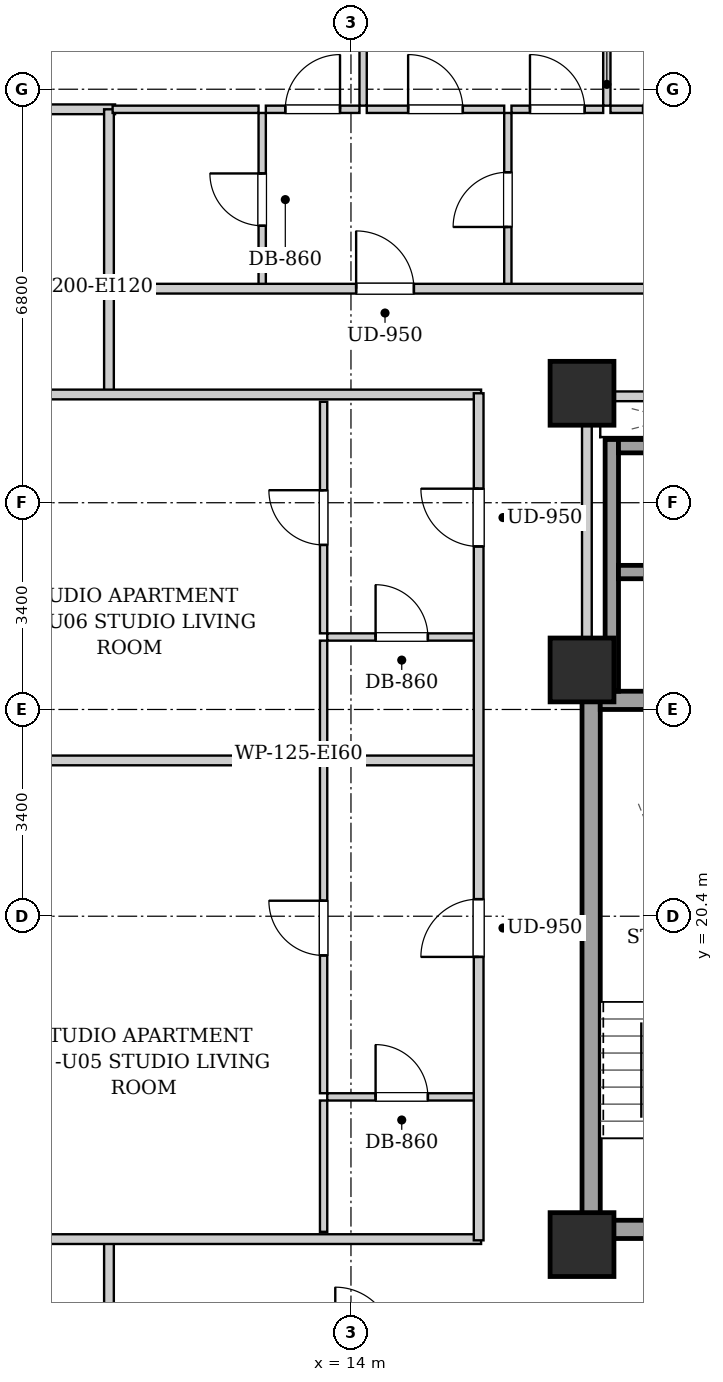
"""IFC4 building model, lengths in metres.
Left out: names, types, materials, properties, quantities, classifications, styles, units other than length and angle.
Written with IfcOpenShell. Run it as: python <this file> out.ifc"""

import sys

from ifc_helpers import new_model, si_unit, direction, frame, frame_2d, origin, origin_2d, place, context, subcontext, project, spatial, rectangle, extrude, element, fill, save


model = new_model("IFC4")
c1 = context("Model", 3, precision=1e-05, world=origin(), true_north=direction((0.0, 1.0)))
c2 = subcontext(c1, "Body", "Model", "MODEL_VIEW")
j1 = project(units=[si_unit("LENGTHUNIT", "METRE"), si_unit("PLANEANGLEUNIT", "RADIAN")], contexts=[c1])
p1 = place(None, origin())
s1 = spatial("IfcSite", under=j1, at=p1, CompositionType="ELEMENT")
p2 = place(p1, origin())
s2 = spatial("IfcBuilding", under=s1, at=p2, CompositionType="ELEMENT")
p3 = place(p2, frame((0.0, 0.0, 110.3)))
s3 = spatial("IfcBuildingStorey", under=s2, at=p3, CompositionType="ELEMENT", Elevation=110.3)
for number, where, z_axis, x_axis in (
    (1, (17.8, 15.0, 0.0), (0.0, 0.0, 1.0), (1.0, 0.0, 0.0)),
    (2, (17.8, 29.0, 0.0), (0.0, 0.0, 1.0), (1.0, 0.0, 0.0)),
    (3, (17.8, 24.45, 0.0), (0.0, 0.0, 1.0), (1.0, 0.0, 0.0)),
):
    element("IfcColumn", number, at=place(p3, frame(where, z_axis=z_axis, x_axis=x_axis)), inside=s3, PredefinedType="COLUMN", context=c2, shape_type="SweptSolid", body=[
        extrude(rectangle(XDim=1.05, YDim=1.05, at=origin_2d()), origin(), (0.0, 0.0, 1.0), 3.2),
    ])
p4 = place(p3, frame((17.95, 15.1, 0.0), z_axis=(0.0, 0.0, 1.0), x_axis=(0.0, 1.0, 0.0)))
e4 = element("IfcWall", 4, at=p4, inside=s3, PredefinedType="SHEAR", context=c2, shape_type="SweptSolid", body=[
    extrude(rectangle(XDim=9.0, YDim=0.3, at=frame_2d((4.5, 0.0))), origin(), (0.0, 0.0, 1.0), 2.94),
])
p5 = place(p3, frame((18.1, 23.95, 0.0), z_axis=(0.0, 0.0, 1.0), x_axis=(1.0, 0.0, 0.0)))
e5 = element("IfcWall", 5, at=p5, inside=s3, PredefinedType="SHEAR", context=c2, shape_type="SweptSolid", body=[
    extrude(rectangle(XDim=2.85, YDim=0.3, at=frame_2d((1.425, 0.0))), origin(), (0.0, 0.0, 1.0), 2.94),
])
p6 = place(p3, frame((18.1, 15.25, 0.0), z_axis=(0.0, 0.0, 1.0), x_axis=(1.0, 0.0, 0.0)))
e6 = element("IfcWall", 6, at=p6, inside=s3, PredefinedType="SHEAR", context=c2, shape_type="SweptSolid", body=[
    extrude(rectangle(XDim=2.85, YDim=0.3, at=frame_2d((1.425, 0.0))), origin(), (0.0, 0.0, 1.0), 2.94),
])
p7 = place(p6, frame((0.86, 0.0, 0.0)))
e7 = element("IfcOpeningElement", 7, at=p7, cuts=e6, PredefinedType="OPENING", context=c2, shape_type="SweptSolid", body=[
    extrude(rectangle(XDim=1.1, YDim=2.05, at=frame_2d((0.55, 1.025))), frame((0.0, 0.16, 0.0), z_axis=(0.0, -1.0, 0.0), x_axis=(1.0, 0.0, 0.0)), (0.0, 0.0, 1.0), 0.32),
])
p8 = place(p3, frame((18.29, 24.1, 0.0), z_axis=(0.0, 0.0, 1.0), x_axis=(0.0, 1.0, 0.0)))
e8 = element("IfcWall", 8, at=p8, inside=s3, PredefinedType="SHEAR", context=c2, shape_type="SweptSolid", body=[
    extrude(rectangle(XDim=4.14, YDim=0.22, at=frame_2d((2.07, 0.0))), origin(), (0.0, 0.0, 1.0), 2.94),
])
for number, where, z_axis, x_axis in (
    (9, (18.4, 26.06, 0.0), (0.0, 0.0, 1.0), (1.0, 0.0, 0.0)),
    (10, (18.4, 28.13, 0.0), (0.0, 0.0, 1.0), (1.0, 0.0, 0.0)),
):
    element("IfcWall", number, at=place(p3, frame(where, z_axis=z_axis, x_axis=x_axis)), inside=s3, PredefinedType="SHEAR", context=c2, shape_type="SweptSolid", body=[
        extrude(rectangle(XDim=1.9, YDim=0.22, at=frame_2d((0.95, 0.0))), origin(), (0.0, 0.0, 1.0), 2.94),
    ])
p9 = place(p3, frame((17.88, 24.12, 0.0), z_axis=(0.0, 0.0, 1.0), x_axis=(0.0, 1.0, 0.0)))
e11 = element("IfcWall", 11, at=p9, inside=s3, PredefinedType="PARTITIONING", context=c2, shape_type="SweptSolid", body=[
    extrude(rectangle(XDim=4.76, YDim=0.16, at=frame_2d((2.38, 0.0))), origin(), (0.0, 0.0, 1.0), 2.94),
])
p10 = place(p3, frame((17.96, 28.95, 0.0), z_axis=(0.0, 0.0, 1.0), x_axis=(1.0, 0.0, 0.0)))
e12 = element("IfcWall", 12, at=p10, inside=s3, PredefinedType="PARTITIONING", context=c2, shape_type="SweptSolid", body=[
    extrude(rectangle(XDim=4.29, YDim=0.16, at=frame_2d((2.145, 0.0))), origin(), (0.0, 0.0, 1.0), 2.313),
])
p11 = place(p10, frame((1.645, 0.0, 0.0)))
e13 = element("IfcOpeningElement", 13, at=p11, cuts=e12, PredefinedType="OPENING", context=c2, shape_type="SweptSolid", body=[
    extrude(rectangle(XDim=0.86, YDim=2.05, at=frame_2d((0.43, 1.025))), frame((0.0, 0.09, 0.0), z_axis=(0.0, -1.0, 0.0), x_axis=(1.0, 0.0, 0.0)), (0.0, 0.0, 1.0), 0.18),
])
for number, where, z_axis, x_axis in (
    (14, (10.02, 13.35, 0.0), (0.0, 0.0, 1.0), (0.0, 1.0, 0.0)),
    (15, (10.02, 28.98, 0.0), (0.0, 0.0, 1.0), (0.0, 1.0, 0.0)),
):
    element("IfcWall", number, at=place(p3, frame(where, z_axis=z_axis, x_axis=x_axis)), inside=s3, PredefinedType="PARTITIONING", context=c2, shape_type="SweptSolid", body=[
        extrude(rectangle(XDim=1.74, YDim=0.16, at=frame_2d((0.87, 0.0))), origin(), (0.0, 0.0, 1.0), 2.94),
    ])
for number, where, z_axis, x_axis in (
    (16, (7.78, 15.09, 0.0), (0.0, 0.0, 1.0), (1.0, 0.0, 0.0)),
    (17, (7.78, 28.98, 0.0), (0.0, 0.0, 1.0), (1.0, 0.0, 0.0)),
):
    element("IfcWall", number, at=place(p3, frame(where, z_axis=z_axis, x_axis=x_axis)), inside=s3, PredefinedType="PARTITIONING", context=c2, shape_type="SweptSolid", body=[
        extrude(rectangle(XDim=8.36, YDim=0.16, at=frame_2d((4.18, 0.0))), origin(), (0.0, 0.0, 1.0), 2.313),
    ])
p12 = place(p3, frame((7.78, 33.67, 0.0), z_axis=(0.0, 0.0, 1.0), x_axis=(1.0, 0.0, 0.0)))
e18 = element("IfcWall", 18, at=p12, inside=s3, PredefinedType="PARTITIONING", context=c2, shape_type="SweptSolid", body=[
    extrude(rectangle(XDim=2.34, YDim=0.16, at=frame_2d((1.17, 0.0))), origin(), (0.0, 0.0, 1.0), 2.94),
])
p13 = place(p3, frame((10.02, 30.76, 0.0), z_axis=(0.0, 0.0, 1.0), x_axis=(0.0, 1.0, 0.0)))
e19 = element("IfcWall", 19, at=p13, inside=s3, PredefinedType="PARTITIONING", context=c2, shape_type="SweptSolid", body=[
    extrude(rectangle(XDim=2.91, YDim=0.16, at=frame_2d((1.455, 0.0))), origin(), (0.0, 0.0, 1.0), 2.94),
])
p14 = place(p3, frame((12.54, 30.76, 0.0), z_axis=(0.0, 0.0, 1.0), x_axis=(0.0, 1.0, 0.0)))
e20 = element("IfcWall", 20, at=p14, inside=s3, PredefinedType="PARTITIONING", context=c2, shape_type="SweptSolid", body=[
    extrude(rectangle(XDim=2.85, YDim=0.12, at=frame_2d((1.425, 0.0))), origin(), (0.0, 0.0, 1.0), 2.94),
])
p15 = place(p14, frame((0.995, 0.0, 0.0)))
e21 = element("IfcOpeningElement", 21, at=p15, cuts=e20, PredefinedType="OPENING", context=c2, shape_type="SweptSolid", body=[
    extrude(rectangle(XDim=0.86, YDim=2.05, at=frame_2d((0.43, 1.025))), frame((0.0, 0.07, 0.0), z_axis=(0.0, -1.0, 0.0), x_axis=(1.0, 0.0, 0.0)), (0.0, 0.0, 1.0), 0.14),
])
p16 = place(p3, frame((10.08, 33.67, 0.0), z_axis=(0.0, 0.0, 1.0), x_axis=(1.0, 0.0, 0.0)))
e22 = element("IfcWall", 22, at=p16, inside=s3, PredefinedType="PARTITIONING", context=c2, shape_type="SweptSolid", body=[
    extrude(rectangle(XDim=2.4, YDim=0.12, at=frame_2d((1.2, 0.0))), origin(), (0.0, 0.0, 1.0), 2.94),
])
p17 = place(p3, frame((16.58, 30.76, 0.0), z_axis=(0.0, 0.0, 1.0), x_axis=(0.0, 1.0, 0.0)))
e23 = element("IfcWall", 23, at=p17, inside=s3, PredefinedType="PARTITIONING", context=c2, shape_type="SweptSolid", body=[
    extrude(rectangle(XDim=2.85, YDim=0.12, at=frame_2d((1.425, 0.0))), origin(), (0.0, 0.0, 1.0), 2.94),
])
p18 = place(p17, frame((0.975, 0.0, 0.0)))
e24 = element("IfcOpeningElement", 24, at=p18, cuts=e23, PredefinedType="OPENING", context=c2, shape_type="SweptSolid", body=[
    extrude(rectangle(XDim=0.9, YDim=2.05, at=frame_2d((0.45, 1.025))), frame((0.0, 0.07, 0.0), z_axis=(0.0, -1.0, 0.0), x_axis=(1.0, 0.0, 0.0)), (0.0, 0.0, 1.0), 0.14),
])
p19 = place(p3, frame((12.6, 33.67, 0.0), z_axis=(0.0, 0.0, 1.0), x_axis=(1.0, 0.0, 0.0)))
e25 = element("IfcWall", 25, at=p19, inside=s3, PredefinedType="PARTITIONING", context=c2, shape_type="SweptSolid", body=[
    extrude(rectangle(XDim=1.54, YDim=0.12, at=frame_2d((0.77, 0.0))), origin(), (0.0, 0.0, 1.0), 2.94),
])
p20 = place(p19, frame((0.32, 0.0, 0.0)))
e26 = element("IfcOpeningElement", 26, at=p20, cuts=e25, PredefinedType="OPENING", context=c2, shape_type="SweptSolid", body=[
    extrude(rectangle(XDim=0.9, YDim=2.05, at=frame_2d((0.45, 1.025))), frame((0.0, 0.07, 0.0), z_axis=(0.0, -1.0, 0.0), x_axis=(1.0, 0.0, 0.0)), (0.0, 0.0, 1.0), 0.14),
])
p21 = place(p3, frame((14.26, 33.67, 0.0), z_axis=(0.0, 0.0, 1.0), x_axis=(1.0, 0.0, 0.0)))
e27 = element("IfcWall", 27, at=p21, inside=s3, PredefinedType="PARTITIONING", context=c2, shape_type="SweptSolid", body=[
    extrude(rectangle(XDim=2.26, YDim=0.12, at=frame_2d((1.13, 0.0))), origin(), (0.0, 0.0, 1.0), 2.94),
])
p22 = place(p21, frame((0.68, 0.0, 0.0)))
e28 = element("IfcOpeningElement", 28, at=p22, cuts=e27, PredefinedType="OPENING", context=c2, shape_type="SweptSolid", body=[
    extrude(rectangle(XDim=0.9, YDim=2.05, at=frame_2d((0.45, 1.025))), frame((0.0, 0.07, 0.0), z_axis=(0.0, -1.0, 0.0), x_axis=(1.0, 0.0, 0.0)), (0.0, 0.0, 1.0), 0.14),
])
p23 = place(p3, frame((16.64, 33.67, 0.0), z_axis=(0.0, 0.0, 1.0), x_axis=(1.0, 0.0, 0.0)))
e29 = element("IfcWall", 29, at=p23, inside=s3, PredefinedType="PARTITIONING", context=c2, shape_type="SweptSolid", body=[
    extrude(rectangle(XDim=1.508, YDim=0.12, at=frame_2d((0.754, 0.0))), origin(), (0.0, 0.0, 1.0), 2.94),
])
p24 = place(p23, frame((0.304, 0.0, 0.0)))
e30 = element("IfcOpeningElement", 30, at=p24, cuts=e29, PredefinedType="OPENING", context=c2, shape_type="SweptSolid", body=[
    extrude(rectangle(XDim=0.9, YDim=2.05, at=frame_2d((0.45, 1.025))), frame((0.0, 0.07, 0.0), z_axis=(0.0, -1.0, 0.0), x_axis=(1.0, 0.0, 0.0)), (0.0, 0.0, 1.0), 0.14),
])
p25 = place(p3, frame((18.268, 33.67, 0.0), z_axis=(0.0, 0.0, 1.0), x_axis=(1.0, 0.0, 0.0)))
e31 = element("IfcWall", 31, at=p25, inside=s3, PredefinedType="PARTITIONING", context=c2, shape_type="SweptSolid", body=[
    extrude(rectangle(XDim=1.972, YDim=0.12, at=frame_2d((0.986, 0.0))), origin(), (0.0, 0.0, 1.0), 2.94),
])
p26 = place(p25, frame((0.536, 0.0, 0.0)))
e32 = element("IfcOpeningElement", 32, at=p26, cuts=e31, PredefinedType="OPENING", context=c2, shape_type="SweptSolid", body=[
    extrude(rectangle(XDim=0.9, YDim=2.05, at=frame_2d((0.45, 1.025))), frame((0.0, 0.07, 0.0), z_axis=(0.0, -1.0, 0.0), x_axis=(1.0, 0.0, 0.0)), (0.0, 0.0, 1.0), 0.14),
])
p27 = place(p3, frame((14.2, 33.73, 0.0), z_axis=(0.0, 0.0, 1.0), x_axis=(0.0, 1.0, 0.0)))
e33 = element("IfcWall", 33, at=p27, inside=s3, PredefinedType="PARTITIONING", context=c2, shape_type="SweptSolid", body=[
    extrude(rectangle(XDim=9.29, YDim=0.12, at=frame_2d((4.645, 0.0))), origin(), (0.0, 0.0, 1.0), 2.94),
])
p28 = place(p27, frame((4.18, 0.0, 0.0)))
e34 = element("IfcOpeningElement", 34, at=p28, cuts=e33, PredefinedType="OPENING", context=c2, shape_type="SweptSolid", body=[
    extrude(rectangle(XDim=0.9, YDim=2.05, at=frame_2d((0.45, 1.025))), frame((0.0, 0.07, 0.0), z_axis=(0.0, -1.0, 0.0), x_axis=(1.0, 0.0, 0.0)), (0.0, 0.0, 1.0), 0.14),
])
p29 = place(p3, frame((18.208, 33.73, 0.0), z_axis=(0.0, 0.0, 1.0), x_axis=(0.0, 1.0, 0.0)))
e35 = element("IfcWall", 35, at=p29, inside=s3, PredefinedType="PARTITIONING", context=c2, shape_type="SweptSolid", body=[
    extrude(rectangle(XDim=9.29, YDim=0.12, at=frame_2d((4.645, 0.0))), origin(), (0.0, 0.0, 1.0), 2.94),
])
p30 = place(p29, frame((4.18, 0.0, 0.0)))
e36 = element("IfcOpeningElement", 36, at=p30, cuts=e35, PredefinedType="OPENING", context=c2, shape_type="SweptSolid", body=[
    extrude(rectangle(XDim=0.9, YDim=2.05, at=frame_2d((0.45, 1.025))), frame((0.0, 0.07, 0.0), z_axis=(0.0, -1.0, 0.0), x_axis=(1.0, 0.0, 0.0)), (0.0, 0.0, 1.0), 0.14),
])
p31 = place(p3, frame((7.78, 22.962, 0.0), z_axis=(0.0, 0.0, 1.0), x_axis=(1.0, 0.0, 0.0)))
e37 = element("IfcWall", 37, at=p31, inside=s3, PredefinedType="PARTITIONING", context=c2, shape_type="SweptSolid", body=[
    extrude(rectangle(XDim=8.28, YDim=0.16, at=frame_2d((4.14, 0.0))), origin(), (0.0, 0.0, 1.0), 2.94),
])
p32 = place(p3, frame((13.61, 17.429, 0.0), z_axis=(0.0, 0.0, 1.0), x_axis=(1.0, 0.0, 0.0)))
e38 = element("IfcWall", 38, at=p32, inside=s3, PredefinedType="PARTITIONING", context=c2, shape_type="SweptSolid", body=[
    extrude(rectangle(XDim=2.45, YDim=0.12, at=frame_2d((1.225, 0.0))), origin(), (0.0, 0.0, 1.0), 2.94),
])
p33 = place(p32, frame((0.795, 0.0, 0.0)))
e39 = element("IfcOpeningElement", 39, at=p33, cuts=e38, PredefinedType="OPENING", context=c2, shape_type="SweptSolid", body=[
    extrude(rectangle(XDim=0.86, YDim=2.05, at=frame_2d((0.43, 1.025))), frame((0.0, 0.07, 0.0), z_axis=(0.0, -1.0, 0.0), x_axis=(1.0, 0.0, 0.0)), (0.0, 0.0, 1.0), 0.14),
])
p34 = place(p3, frame((13.55, 15.21, 0.0), z_axis=(0.0, 0.0, 1.0), x_axis=(0.0, 1.0, 0.0)))
e40 = element("IfcWall", 40, at=p34, inside=s3, PredefinedType="PARTITIONING", context=c2, shape_type="SweptSolid", body=[
    extrude(rectangle(XDim=2.159, YDim=0.12, at=frame_2d((1.08, 0.0))), origin(), (0.0, 0.0, 1.0), 2.94),
])
p35 = place(p3, frame((13.55, 17.489, 0.0), z_axis=(0.0, 0.0, 1.0), x_axis=(0.0, 1.0, 0.0)))
e41 = element("IfcWall", 41, at=p35, inside=s3, PredefinedType="PARTITIONING", context=c2, shape_type="SweptSolid", body=[
    extrude(rectangle(XDim=5.433, YDim=0.12, at=frame_2d((2.717, 0.0))), origin(), (0.0, 0.0, 1.0), 2.94),
])
p36 = place(p35, frame((2.266, 0.0, 0.0)))
e42 = element("IfcOpeningElement", 42, at=p36, cuts=e41, PredefinedType="OPENING", context=c2, shape_type="SweptSolid", body=[
    extrude(rectangle(XDim=0.9, YDim=2.05, at=frame_2d((0.45, 1.025))), frame((0.0, 0.07, 0.0), z_axis=(0.0, -1.0, 0.0), x_axis=(1.0, 0.0, 0.0)), (0.0, 0.0, 1.0), 0.14),
])
p37 = place(p3, frame((13.61, 24.992, 0.0), z_axis=(0.0, 0.0, 1.0), x_axis=(1.0, 0.0, 0.0)))
e43 = element("IfcWall", 43, at=p37, inside=s3, PredefinedType="PARTITIONING", context=c2, shape_type="SweptSolid", body=[
    extrude(rectangle(XDim=2.45, YDim=0.12, at=frame_2d((1.225, 0.0))), origin(), (0.0, 0.0, 1.0), 2.94),
])
p38 = place(p37, frame((0.795, 0.0, 0.0)))
e44 = element("IfcOpeningElement", 44, at=p38, cuts=e43, PredefinedType="OPENING", context=c2, shape_type="SweptSolid", body=[
    extrude(rectangle(XDim=0.86, YDim=2.05, at=frame_2d((0.43, 1.025))), frame((0.0, 0.07, 0.0), z_axis=(0.0, -1.0, 0.0), x_axis=(1.0, 0.0, 0.0)), (0.0, 0.0, 1.0), 0.14),
])
p39 = place(p3, frame((13.55, 23.082, 0.0), z_axis=(0.0, 0.0, 1.0), x_axis=(0.0, 1.0, 0.0)))
e45 = element("IfcWall", 45, at=p39, inside=s3, PredefinedType="PARTITIONING", context=c2, shape_type="SweptSolid", body=[
    extrude(rectangle(XDim=1.85, YDim=0.12, at=frame_2d((0.925, 0.0))), origin(), (0.0, 0.0, 1.0), 2.94),
])
p40 = place(p3, frame((13.55, 25.052, 0.0), z_axis=(0.0, 0.0, 1.0), x_axis=(0.0, 1.0, 0.0)))
e46 = element("IfcWall", 46, at=p40, inside=s3, PredefinedType="PARTITIONING", context=c2, shape_type="SweptSolid", body=[
    extrude(rectangle(XDim=3.808, YDim=0.12, at=frame_2d((1.904, 0.0))), origin(), (0.0, 0.0, 1.0), 2.94),
])
p41 = place(p40, frame((1.454, 0.0, 0.0)))
e47 = element("IfcOpeningElement", 47, at=p41, cuts=e46, PredefinedType="OPENING", context=c2, shape_type="SweptSolid", body=[
    extrude(rectangle(XDim=0.9, YDim=2.05, at=frame_2d((0.45, 1.025))), frame((0.0, 0.07, 0.0), z_axis=(0.0, -1.0, 0.0), x_axis=(1.0, 0.0, 0.0)), (0.0, 0.0, 1.0), 0.14),
])
p42 = place(p3, frame((10.05, 30.72, 0.0), z_axis=(0.0, 0.0, 1.0), x_axis=(1.0, 0.0, 0.0)))
e48 = element("IfcWall", 48, at=p42, inside=s3, PredefinedType="PARTITIONING", context=c2, shape_type="SweptSolid", body=[
    extrude(rectangle(XDim=30.8, YDim=0.16, at=frame_2d((15.4, 0.0))), origin(), (0.0, 0.0, 1.0), 2.94),
])
p43 = place(p42, frame((4.035, 0.0, 0.0)))
e49 = element("IfcOpeningElement", 49, at=p43, cuts=e48, PredefinedType="OPENING", context=c2, shape_type="SweptSolid", body=[
    extrude(rectangle(XDim=0.95, YDim=2.1, at=frame_2d((0.475, 1.05))), frame((0.0, 0.09, 0.0), z_axis=(0.0, -1.0, 0.0), x_axis=(1.0, 0.0, 0.0)), (0.0, 0.0, 1.0), 0.18),
])
p44 = place(p42, frame((25.11, 0.0, 0.0)))
e50 = element("IfcOpeningElement", 50, at=p44, cuts=e48, PredefinedType="OPENING", context=c2, shape_type="SweptSolid", body=[
    extrude(rectangle(XDim=0.95, YDim=2.1, at=frame_2d((0.475, 1.05))), frame((0.0, 0.09, 0.0), z_axis=(0.0, -1.0, 0.0), x_axis=(1.0, 0.0, 0.0)), (0.0, 0.0, 1.0), 0.18),
])
p45 = place(p3, frame((16.1, 15.07, 0.0), z_axis=(0.0, 0.0, 1.0), x_axis=(0.0, 1.0, 0.0)))
e51 = element("IfcWall", 51, at=p45, inside=s3, PredefinedType="PARTITIONING", context=c2, shape_type="SweptSolid", body=[
    extrude(rectangle(XDim=13.93, YDim=0.16, at=frame_2d((6.965, 0.0))), origin(), (0.0, 0.0, 1.0), 2.94),
])
p46 = place(p45, frame((4.661, 0.0, 0.0)))
e52 = element("IfcOpeningElement", 52, at=p46, cuts=e51, PredefinedType="OPENING", context=c2, shape_type="SweptSolid", body=[
    extrude(rectangle(XDim=0.95, YDim=2.1, at=frame_2d((0.475, 1.05))), frame((0.0, 0.09, 0.0), z_axis=(0.0, -1.0, 0.0), x_axis=(1.0, 0.0, 0.0)), (0.0, 0.0, 1.0), 0.18),
])
p47 = place(p45, frame((11.411, 0.0, 0.0)))
e53 = element("IfcOpeningElement", 53, at=p47, cuts=e51, PredefinedType="OPENING", context=c2, shape_type="SweptSolid", body=[
    extrude(rectangle(XDim=0.95, YDim=2.1, at=frame_2d((0.475, 1.05))), frame((0.0, 0.09, 0.0), z_axis=(0.0, -1.0, 0.0), x_axis=(1.0, 0.0, 0.0)), (0.0, 0.0, 1.0), 0.18),
])
p48 = place(p15, origin())
e54 = element("IfcDoor", 54, at=p48, inside=s3, OperationType="SINGLE_SWING_RIGHT", PredefinedType="DOOR", context=c2, shape_type="SweptSolid", body=[
    extrude(rectangle(XDim=0.86, YDim=2.05, at=frame_2d((0.43, 1.025))), frame((0.0, 0.025, 0.0), z_axis=(0.0, -1.0, 0.0), x_axis=(1.0, 0.0, 0.0)), (0.0, 0.0, 1.0), 0.05),
])
fill(e21, e54)
p49 = place(p18, origin())
e55 = element("IfcDoor", 55, at=p49, inside=s3, OperationType="SINGLE_SWING_LEFT", PredefinedType="DOOR", context=c2, shape_type="SweptSolid", body=[
    extrude(rectangle(XDim=0.9, YDim=2.05, at=frame_2d((0.45, 1.025))), frame((0.0, 0.025, 0.0), z_axis=(0.0, -1.0, 0.0), x_axis=(1.0, 0.0, 0.0)), (0.0, 0.0, 1.0), 0.05),
])
fill(e24, e55)
p50 = place(p20, origin())
e56 = element("IfcDoor", 56, at=p50, inside=s3, OperationType="SINGLE_SWING_RIGHT", PredefinedType="DOOR", context=c2, shape_type="SweptSolid", body=[
    extrude(rectangle(XDim=0.9, YDim=2.05, at=frame_2d((0.45, 1.025))), frame((0.0, 0.025, 0.0), z_axis=(0.0, -1.0, 0.0), x_axis=(1.0, 0.0, 0.0)), (0.0, 0.0, 1.0), 0.05),
])
fill(e26, e56)
p51 = place(p22, origin())
e57 = element("IfcDoor", 57, at=p51, inside=s3, OperationType="SINGLE_SWING_LEFT", PredefinedType="DOOR", context=c2, shape_type="SweptSolid", body=[
    extrude(rectangle(XDim=0.9, YDim=2.05, at=frame_2d((0.45, 1.025))), frame((0.0, 0.025, 0.0), z_axis=(0.0, -1.0, 0.0), x_axis=(1.0, 0.0, 0.0)), (0.0, 0.0, 1.0), 0.05),
])
fill(e28, e57)
p52 = place(p24, origin())
e58 = element("IfcDoor", 58, at=p52, inside=s3, OperationType="SINGLE_SWING_LEFT", PredefinedType="DOOR", context=c2, shape_type="SweptSolid", body=[
    extrude(rectangle(XDim=0.9, YDim=2.05, at=frame_2d((0.45, 1.025))), frame((0.0, 0.025, 0.0), z_axis=(0.0, -1.0, 0.0), x_axis=(1.0, 0.0, 0.0)), (0.0, 0.0, 1.0), 0.05),
])
fill(e30, e58)
p53 = place(p33, origin())
e59 = element("IfcDoor", 59, at=p53, inside=s3, OperationType="SINGLE_SWING_LEFT", PredefinedType="DOOR", context=c2, shape_type="SweptSolid", body=[
    extrude(rectangle(XDim=0.86, YDim=2.05, at=frame_2d((0.43, 1.025))), frame((0.0, 0.025, 0.0), z_axis=(0.0, -1.0, 0.0), x_axis=(1.0, 0.0, 0.0)), (0.0, 0.0, 1.0), 0.05),
])
fill(e39, e59)
p54 = place(p36, origin())
e60 = element("IfcDoor", 60, at=p54, inside=s3, OperationType="SINGLE_SWING_RIGHT", PredefinedType="DOOR", context=c2, shape_type="SweptSolid", body=[
    extrude(rectangle(XDim=0.9, YDim=2.05, at=frame_2d((0.45, 1.025))), frame((0.0, 0.025, 0.0), z_axis=(0.0, -1.0, 0.0), x_axis=(1.0, 0.0, 0.0)), (0.0, 0.0, 1.0), 0.05),
])
fill(e42, e60)
p55 = place(p38, origin())
e61 = element("IfcDoor", 61, at=p55, inside=s3, OperationType="SINGLE_SWING_LEFT", PredefinedType="DOOR", context=c2, shape_type="SweptSolid", body=[
    extrude(rectangle(XDim=0.86, YDim=2.05, at=frame_2d((0.43, 1.025))), frame((0.0, 0.025, 0.0), z_axis=(0.0, -1.0, 0.0), x_axis=(1.0, 0.0, 0.0)), (0.0, 0.0, 1.0), 0.05),
])
fill(e44, e61)
p56 = place(p41, origin())
e62 = element("IfcDoor", 62, at=p56, inside=s3, OperationType="SINGLE_SWING_RIGHT", PredefinedType="DOOR", context=c2, shape_type="SweptSolid", body=[
    extrude(rectangle(XDim=0.9, YDim=2.05, at=frame_2d((0.45, 1.025))), frame((0.0, 0.025, 0.0), z_axis=(0.0, -1.0, 0.0), x_axis=(1.0, 0.0, 0.0)), (0.0, 0.0, 1.0), 0.05),
])
fill(e47, e62)
p57 = place(p43, origin())
e63 = element("IfcDoor", 63, at=p57, inside=s3, OperationType="SINGLE_SWING_LEFT", PredefinedType="DOOR", context=c2, shape_type="SweptSolid", body=[
    extrude(rectangle(XDim=0.95, YDim=2.1, at=frame_2d((0.475, 1.05))), frame((0.0, 0.025, 0.0), z_axis=(0.0, -1.0, 0.0), x_axis=(1.0, 0.0, 0.0)), (0.0, 0.0, 1.0), 0.05),
])
fill(e49, e63)
p58 = place(p46, origin())
e64 = element("IfcDoor", 64, at=p58, inside=s3, OperationType="SINGLE_SWING_LEFT", PredefinedType="DOOR", context=c2, shape_type="SweptSolid", body=[
    extrude(rectangle(XDim=0.95, YDim=2.1, at=frame_2d((0.475, 1.05))), frame((0.0, 0.025, 0.0), z_axis=(0.0, -1.0, 0.0), x_axis=(1.0, 0.0, 0.0)), (0.0, 0.0, 1.0), 0.05),
])
fill(e52, e64)
p59 = place(p47, origin())
e65 = element("IfcDoor", 65, at=p59, inside=s3, OperationType="SINGLE_SWING_RIGHT", PredefinedType="DOOR", context=c2, shape_type="SweptSolid", body=[
    extrude(rectangle(XDim=0.95, YDim=2.1, at=frame_2d((0.475, 1.05))), frame((0.0, 0.025, 0.0), z_axis=(0.0, -1.0, 0.0), x_axis=(1.0, 0.0, 0.0)), (0.0, 0.0, 1.0), 0.05),
])
fill(e53, e65)
save(model, sys.argv[1])
